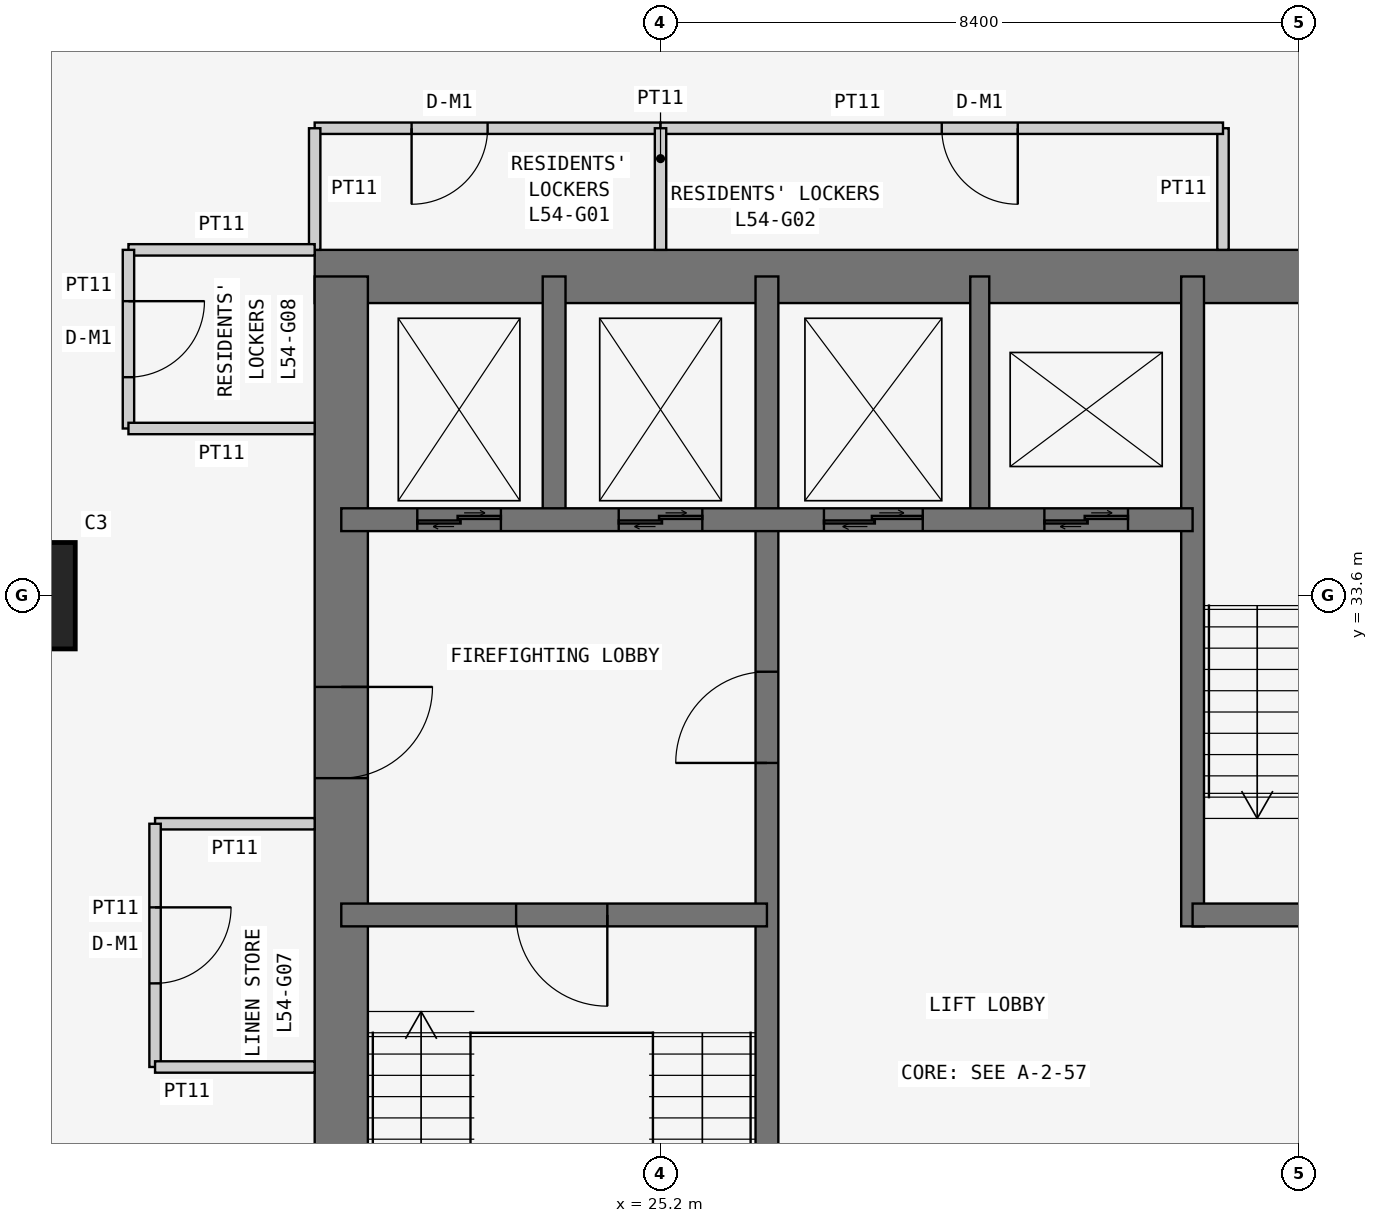
"""IFC4 building model, lengths in metres.
Left out: names, types, materials, properties, quantities, classifications, styles, units other than length and angle.
Written with IfcOpenShell. Run it as: python <this file> out.ifc"""

import sys

from ifc_helpers import new_model, si_unit, direction, frame, frame_2d, origin, origin_2d, place, context, subcontext, project, spatial, rectangle, extrude, element, fill, save


model = new_model("IFC4")
c1 = context("Model", 3, precision=1e-05, world=origin(), true_north=direction((0.0, 1.0)))
c2 = subcontext(c1, "Body", "Model", "MODEL_VIEW")
j1 = project(units=[si_unit("LENGTHUNIT", "METRE"), si_unit("PLANEANGLEUNIT", "RADIAN")], contexts=[c1])
p1 = place(None, origin())
s1 = spatial("IfcSite", under=j1, at=p1, CompositionType="ELEMENT")
p2 = place(p1, origin())
s2 = spatial("IfcBuilding", under=s1, at=p2, CompositionType="ELEMENT")
p3 = place(p2, frame((0.0, 0.0, 208.5)))
s3 = spatial("IfcBuildingStorey", under=s2, at=p3, CompositionType="ELEMENT", Elevation=208.5)
p4 = place(p3, frame((16.8, 33.6, 0.0), z_axis=(0.0, 0.0, 1.0), x_axis=(1.0, 0.0, 0.0)))
e1 = element("IfcColumn", 1, at=p4, inside=s3, PredefinedType="COLUMN", context=c2, shape_type="SweptSolid", body=[
    extrude(rectangle(XDim=1.4, YDim=1.4, at=origin_2d()), origin(), (0.0, 0.0, 1.0), 3.6),
])
p5 = place(p3, frame((37.8, 37.8, 0.0), z_axis=(0.0, 0.0, 1.0), x_axis=(-1.0, 0.0, 0.0)))
e2 = element("IfcWall", 2, at=p5, inside=s3, PredefinedType="SHEAR", context=c2, shape_type="SweptSolid", body=[
    extrude(rectangle(XDim=17.15, YDim=0.7, at=frame_2d((8.575, 0.0))), origin(), (0.0, 0.0, 1.0), 3.6),
])
p6 = place(p3, frame((21.0, 37.8, 0.0), z_axis=(0.0, 0.0, 1.0), x_axis=(0.0, -1.0, 0.0)))
e3 = element("IfcWall", 3, at=p6, inside=s3, PredefinedType="SHEAR", context=c2, shape_type="SweptSolid", body=[
    extrude(rectangle(XDim=17.15, YDim=0.7, at=frame_2d((8.575, 0.0))), origin(), (0.0, 0.0, 1.0), 3.6),
])
p7 = place(p6, frame((5.4, 0.0, 0.0)))
e4 = element("IfcOpeningElement", 4, at=p7, cuts=e3, PredefinedType="OPENING", context=c2, shape_type="SweptSolid", body=[
    extrude(rectangle(XDim=1.2, YDim=2.1, at=frame_2d((0.6, 1.05))), frame((0.0, 0.36, 0.0), z_axis=(0.0, -1.0, 0.0), x_axis=(1.0, 0.0, 0.0)), (0.0, 0.0, 1.0), 0.72),
])
p8 = place(p3, frame((26.6, 21.0, 0.0), z_axis=(0.0, 0.0, 1.0), x_axis=(0.0, 1.0, 0.0)))
e5 = element("IfcWall", 5, at=p8, inside=s3, PredefinedType="SHEAR", context=c2, shape_type="SweptSolid", body=[
    extrude(rectangle(XDim=16.8, YDim=0.3, at=frame_2d((8.4, 0.0))), origin(), (0.0, 0.0, 1.0), 3.6),
])
p9 = place(p8, frame((10.4, 0.0, 0.0)))
e6 = element("IfcOpeningElement", 6, at=p9, cuts=e5, PredefinedType="OPENING", context=c2, shape_type="SweptSolid", body=[
    extrude(rectangle(XDim=1.2, YDim=2.1, at=frame_2d((0.6, 1.05))), frame((0.0, 0.16, 0.0), z_axis=(0.0, -1.0, 0.0), x_axis=(1.0, 0.0, 0.0)), (0.0, 0.0, 1.0), 0.32),
])
p10 = place(p3, frame((21.0, 29.4, 0.0), z_axis=(0.0, 0.0, 1.0), x_axis=(1.0, 0.0, 0.0)))
e7 = element("IfcWall", 7, at=p10, inside=s3, PredefinedType="SHEAR", context=c2, shape_type="SweptSolid", body=[
    extrude(rectangle(XDim=5.6, YDim=0.3, at=frame_2d((2.8, 0.0))), origin(), (0.0, 0.0, 1.0), 3.6),
])
p11 = place(p10, frame((2.3, 0.0, 0.0)))
e8 = element("IfcOpeningElement", 8, at=p11, cuts=e7, PredefinedType="OPENING", context=c2, shape_type="SweptSolid", body=[
    extrude(rectangle(XDim=1.2, YDim=2.1, at=frame_2d((0.6, 1.05))), frame((0.0, 0.16, 0.0), z_axis=(0.0, -1.0, 0.0), x_axis=(1.0, 0.0, 0.0)), (0.0, 0.0, 1.0), 0.32),
])
p12 = place(p3, frame((21.0, 34.6, 0.0), z_axis=(0.0, 0.0, 1.0), x_axis=(1.0, 0.0, 0.0)))
e9 = element("IfcWall", 9, at=p12, inside=s3, PredefinedType="SHEAR", context=c2, shape_type="SweptSolid", body=[
    extrude(rectangle(XDim=11.2, YDim=0.3, at=frame_2d((5.6, 0.0))), origin(), (0.0, 0.0, 1.0), 3.6),
])
p13 = place(p12, frame((9.25, 0.0, 0.0)))
e10 = element("IfcOpeningElement", 10, at=p13, cuts=e9, PredefinedType="OPENING", context=c2, shape_type="SweptSolid", body=[
    extrude(rectangle(XDim=1.1, YDim=2.1, at=frame_2d((0.55, 1.05))), frame((0.0, 0.16, 0.0), z_axis=(0.0, -1.0, 0.0), x_axis=(1.0, 0.0, 0.0)), (0.0, 0.0, 1.0), 0.32),
])
p14 = place(p12, frame((1.0, 0.0, 0.0)))
e11 = element("IfcOpeningElement", 11, at=p14, cuts=e9, PredefinedType="OPENING", context=c2, shape_type="SweptSolid", body=[
    extrude(rectangle(XDim=1.1, YDim=2.1, at=frame_2d((0.55, 1.05))), frame((0.0, 0.16, 0.0), z_axis=(0.0, -1.0, 0.0), x_axis=(1.0, 0.0, 0.0)), (0.0, 0.0, 1.0), 0.32),
])
p15 = place(p12, frame((3.65, 0.0, 0.0)))
e12 = element("IfcOpeningElement", 12, at=p15, cuts=e9, PredefinedType="OPENING", context=c2, shape_type="SweptSolid", body=[
    extrude(rectangle(XDim=1.1, YDim=2.1, at=frame_2d((0.55, 1.05))), frame((0.0, 0.16, 0.0), z_axis=(0.0, -1.0, 0.0), x_axis=(1.0, 0.0, 0.0)), (0.0, 0.0, 1.0), 0.32),
])
p16 = place(p12, frame((6.35, 0.0, 0.0)))
e13 = element("IfcOpeningElement", 13, at=p16, cuts=e9, PredefinedType="OPENING", context=c2, shape_type="SweptSolid", body=[
    extrude(rectangle(XDim=1.3, YDim=2.1, at=frame_2d((0.65, 1.05))), frame((0.0, 0.16, 0.0), z_axis=(0.0, -1.0, 0.0), x_axis=(1.0, 0.0, 0.0)), (0.0, 0.0, 1.0), 0.32),
])
p17 = place(p3, frame((23.8, 34.6, 0.0), z_axis=(0.0, 0.0, 1.0), x_axis=(0.0, 1.0, 0.0)))
e14 = element("IfcWall", 14, at=p17, inside=s3, PredefinedType="SHEAR", context=c2, shape_type="SweptSolid", body=[
    extrude(rectangle(XDim=3.2, YDim=0.3, at=frame_2d((1.6, 0.0))), origin(), (0.0, 0.0, 1.0), 3.6),
])
p18 = place(p3, frame((32.2, 29.25, 0.0), z_axis=(0.0, 0.0, 1.0), x_axis=(0.0, 1.0, 0.0)))
e15 = element("IfcWall", 15, at=p18, inside=s3, PredefinedType="SHEAR", context=c2, shape_type="SweptSolid", body=[
    extrude(rectangle(XDim=8.55, YDim=0.3, at=frame_2d((4.275, 0.0))), origin(), (0.0, 0.0, 1.0), 3.6),
])
p19 = place(p3, frame((32.2, 29.4, 0.0), z_axis=(0.0, 0.0, 1.0), x_axis=(1.0, 0.0, 0.0)))
e16 = element("IfcWall", 16, at=p19, inside=s3, PredefinedType="SHEAR", context=c2, shape_type="SweptSolid", body=[
    extrude(rectangle(XDim=5.6, YDim=0.3, at=frame_2d((2.8, 0.0))), origin(), (0.0, 0.0, 1.0), 3.6),
])
p20 = place(p19, frame((2.0, 0.0, 0.0)))
e17 = element("IfcOpeningElement", 17, at=p20, cuts=e16, PredefinedType="OPENING", context=c2, shape_type="SweptSolid", body=[
    extrude(rectangle(XDim=1.2, YDim=2.1, at=frame_2d((0.6, 1.05))), frame((0.0, 0.16, 0.0), z_axis=(0.0, -1.0, 0.0), x_axis=(1.0, 0.0, 0.0)), (0.0, 0.0, 1.0), 0.32),
])
p21 = place(p3, frame((29.4, 34.6, 0.0), z_axis=(0.0, 0.0, 1.0), x_axis=(0.0, 1.0, 0.0)))
e18 = element("IfcWall", 18, at=p21, inside=s3, PredefinedType="SHEAR", context=c2, shape_type="SweptSolid", body=[
    extrude(rectangle(XDim=3.2, YDim=0.25, at=frame_2d((1.6, 0.0))), origin(), (0.0, 0.0, 1.0), 3.6),
])
p22 = place(p3, frame((25.2, 39.75, 0.0), z_axis=(0.0, 0.0, 1.0), x_axis=(-1.0, 0.0, 0.0)))
e19 = element("IfcWall", 19, at=p22, inside=s3, PredefinedType="PARTITIONING", context=c2, shape_type="SweptSolid", body=[
    extrude(rectangle(XDim=4.55, YDim=0.15, at=frame_2d((2.275, 0.0))), origin(), (0.0, 0.0, 1.0), 3.45),
])
p23 = place(p22, frame((2.275, 0.0, 0.0)))
e20 = element("IfcOpeningElement", 20, at=p23, cuts=e19, PredefinedType="OPENING", context=c2, shape_type="SweptSolid", body=[
    extrude(rectangle(XDim=1.0, YDim=2.1, at=frame_2d((0.5, 1.05))), frame((0.0, 0.085, 0.0), z_axis=(0.0, -1.0, 0.0), x_axis=(1.0, 0.0, 0.0)), (0.0, 0.0, 1.0), 0.17),
])
for number, where, z_axis, x_axis in (
    (21, (20.65, 39.75, 0.0), (0.0, 0.0, 1.0), (0.0, -1.0, 0.0)),
    (22, (32.6, 38.15, 0.0), (0.0, 0.0, 1.0), (0.0, 1.0, 0.0)),
):
    element("IfcWall", number, at=place(p3, frame(where, z_axis=z_axis, x_axis=x_axis)), inside=s3, PredefinedType="PARTITIONING", context=c2, shape_type="SweptSolid", body=[
        extrude(rectangle(XDim=1.6, YDim=0.15, at=frame_2d((0.8, 0.0))), origin(), (0.0, 0.0, 1.0), 3.45),
    ])
p24 = place(p3, frame((32.6, 39.75, 0.0), z_axis=(0.0, 0.0, 1.0), x_axis=(-1.0, 0.0, 0.0)))
e23 = element("IfcWall", 23, at=p24, inside=s3, PredefinedType="PARTITIONING", context=c2, shape_type="SweptSolid", body=[
    extrude(rectangle(XDim=7.4, YDim=0.15, at=frame_2d((3.7, 0.0))), origin(), (0.0, 0.0, 1.0), 3.45),
])
p25 = place(p24, frame((2.7, 0.0, 0.0)))
e24 = element("IfcOpeningElement", 24, at=p25, cuts=e23, PredefinedType="OPENING", context=c2, shape_type="SweptSolid", body=[
    extrude(rectangle(XDim=1.0, YDim=2.1, at=frame_2d((0.5, 1.05))), frame((0.0, 0.085, 0.0), z_axis=(0.0, -1.0, 0.0), x_axis=(1.0, 0.0, 0.0)), (0.0, 0.0, 1.0), 0.17),
])
p26 = place(p3, frame((20.65, 30.6, 0.0), z_axis=(0.0, 0.0, 1.0), x_axis=(-1.0, 0.0, 0.0)))
e25 = element("IfcWall", 25, at=p26, inside=s3, PredefinedType="PARTITIONING", context=c2, shape_type="SweptSolid", body=[
    extrude(rectangle(XDim=2.1, YDim=0.15, at=frame_2d((1.05, 0.0))), origin(), (0.0, 0.0, 1.0), 3.45),
])
p27 = place(p3, frame((18.55, 30.6, 0.0), z_axis=(0.0, 0.0, 1.0), x_axis=(0.0, -1.0, 0.0)))
e26 = element("IfcWall", 26, at=p27, inside=s3, PredefinedType="PARTITIONING", context=c2, shape_type="SweptSolid", body=[
    extrude(rectangle(XDim=3.2, YDim=0.15, at=frame_2d((1.6, 0.0))), origin(), (0.0, 0.0, 1.0), 3.45),
])
p28 = place(p27, frame((1.1, 0.0, 0.0)))
e27 = element("IfcOpeningElement", 27, at=p28, cuts=e26, PredefinedType="OPENING", context=c2, shape_type="SweptSolid", body=[
    extrude(rectangle(XDim=1.0, YDim=2.1, at=frame_2d((0.5, 1.05))), frame((0.0, 0.085, 0.0), z_axis=(0.0, -1.0, 0.0), x_axis=(1.0, 0.0, 0.0)), (0.0, 0.0, 1.0), 0.17),
])
p29 = place(p3, frame((18.55, 27.4, 0.0), z_axis=(0.0, 0.0, 1.0), x_axis=(1.0, 0.0, 0.0)))
e28 = element("IfcWall", 28, at=p29, inside=s3, PredefinedType="PARTITIONING", context=c2, shape_type="SweptSolid", body=[
    extrude(rectangle(XDim=2.1, YDim=0.15, at=frame_2d((1.05, 0.0))), origin(), (0.0, 0.0, 1.0), 3.45),
])
p30 = place(p3, frame((20.65, 38.15, 0.0), z_axis=(0.0, 0.0, 1.0), x_axis=(-1.0, 0.0, 0.0)))
e29 = element("IfcWall", 29, at=p30, inside=s3, PredefinedType="PARTITIONING", context=c2, shape_type="SweptSolid", body=[
    extrude(rectangle(XDim=2.45, YDim=0.15, at=frame_2d((1.225, 0.0))), origin(), (0.0, 0.0, 1.0), 3.45),
])
p31 = place(p3, frame((18.2, 38.15, 0.0), z_axis=(0.0, 0.0, 1.0), x_axis=(0.0, -1.0, 0.0)))
e30 = element("IfcWall", 30, at=p31, inside=s3, PredefinedType="PARTITIONING", context=c2, shape_type="SweptSolid", body=[
    extrude(rectangle(XDim=2.35, YDim=0.15, at=frame_2d((1.175, 0.0))), origin(), (0.0, 0.0, 1.0), 3.45),
])
p32 = place(p31, frame((0.675, 0.0, 0.0)))
e31 = element("IfcOpeningElement", 31, at=p32, cuts=e30, PredefinedType="OPENING", context=c2, shape_type="SweptSolid", body=[
    extrude(rectangle(XDim=1.0, YDim=2.1, at=frame_2d((0.5, 1.05))), frame((0.0, 0.085, 0.0), z_axis=(0.0, -1.0, 0.0), x_axis=(1.0, 0.0, 0.0)), (0.0, 0.0, 1.0), 0.17),
])
p33 = place(p3, frame((18.2, 35.8, 0.0), z_axis=(0.0, 0.0, 1.0), x_axis=(1.0, 0.0, 0.0)))
e32 = element("IfcWall", 32, at=p33, inside=s3, PredefinedType="PARTITIONING", context=c2, shape_type="SweptSolid", body=[
    extrude(rectangle(XDim=2.45, YDim=0.15, at=frame_2d((1.225, 0.0))), origin(), (0.0, 0.0, 1.0), 3.45),
])
p34 = place(p3, frame((25.2, 38.15, 0.0), z_axis=(0.0, 0.0, 1.0), x_axis=(0.0, 1.0, 0.0)))
e33 = element("IfcWall", 33, at=p34, inside=s3, PredefinedType="PARTITIONING", context=c2, shape_type="SweptSolid", body=[
    extrude(rectangle(XDim=1.6, YDim=0.15, at=frame_2d((0.8, 0.0))), origin(), (0.0, 0.0, 1.0), 2.767),
])
p35 = place(p23, origin())
e34 = element("IfcDoor", 34, at=p35, inside=s3, OperationType="SINGLE_SWING_RIGHT", PredefinedType="DOOR", context=c2, shape_type="SweptSolid", body=[
    extrude(rectangle(XDim=1.0, YDim=2.1, at=frame_2d((0.5, 1.05))), frame((0.0, 0.025, 0.0), z_axis=(0.0, -1.0, 0.0), x_axis=(1.0, 0.0, 0.0)), (0.0, 0.0, 1.0), 0.05),
])
fill(e20, e34)
p36 = place(p25, origin())
e35 = element("IfcDoor", 35, at=p36, inside=s3, OperationType="SINGLE_SWING_LEFT", PredefinedType="DOOR", context=c2, shape_type="SweptSolid", body=[
    extrude(rectangle(XDim=1.0, YDim=2.1, at=frame_2d((0.5, 1.05))), frame((0.0, 0.025, 0.0), z_axis=(0.0, -1.0, 0.0), x_axis=(1.0, 0.0, 0.0)), (0.0, 0.0, 1.0), 0.05),
])
fill(e24, e35)
p37 = place(p28, origin())
e36 = element("IfcDoor", 36, at=p37, inside=s3, OperationType="SINGLE_SWING_LEFT", PredefinedType="DOOR", context=c2, shape_type="SweptSolid", body=[
    extrude(rectangle(XDim=1.0, YDim=2.1, at=frame_2d((0.5, 1.05))), frame((0.0, 0.025, 0.0), z_axis=(0.0, -1.0, 0.0), x_axis=(1.0, 0.0, 0.0)), (0.0, 0.0, 1.0), 0.05),
])
fill(e27, e36)
p38 = place(p32, origin())
e37 = element("IfcDoor", 37, at=p38, inside=s3, OperationType="SINGLE_SWING_LEFT", PredefinedType="DOOR", context=c2, shape_type="SweptSolid", body=[
    extrude(rectangle(XDim=1.0, YDim=2.1, at=frame_2d((0.5, 1.05))), frame((0.0, 0.025, 0.0), z_axis=(0.0, -1.0, 0.0), x_axis=(1.0, 0.0, 0.0)), (0.0, 0.0, 1.0), 0.05),
])
fill(e31, e37)
p39 = place(p7, origin())
e38 = element("IfcDoor", 38, at=p39, inside=s3, OperationType="SINGLE_SWING_LEFT", PredefinedType="DOOR", context=c2, shape_type="SweptSolid", body=[
    extrude(rectangle(XDim=1.2, YDim=2.1, at=frame_2d((0.6, 1.05))), frame((0.0, 0.025, 0.0), z_axis=(0.0, -1.0, 0.0), x_axis=(1.0, 0.0, 0.0)), (0.0, 0.0, 1.0), 0.05),
])
fill(e4, e38)
p40 = place(p11, frame((1.2, 0.0, 0.0), z_axis=(0.0, 0.0, 1.0), x_axis=(-1.0, 0.0, 0.0)))
e39 = element("IfcDoor", 39, at=p40, inside=s3, OperationType="SINGLE_SWING_LEFT", PredefinedType="DOOR", context=c2, shape_type="SweptSolid", body=[
    extrude(rectangle(XDim=1.2, YDim=2.1, at=frame_2d((0.6, 1.05))), frame((0.0, 0.025, 0.0), z_axis=(0.0, -1.0, 0.0), x_axis=(1.0, 0.0, 0.0)), (0.0, 0.0, 1.0), 0.05),
])
fill(e8, e39)
p41 = place(p9, origin())
e40 = element("IfcDoor", 40, at=p41, inside=s3, OperationType="SINGLE_SWING_LEFT", PredefinedType="DOOR", context=c2, shape_type="SweptSolid", body=[
    extrude(rectangle(XDim=1.2, YDim=2.1, at=frame_2d((0.6, 1.05))), frame((0.0, 0.025, 0.0), z_axis=(0.0, -1.0, 0.0), x_axis=(1.0, 0.0, 0.0)), (0.0, 0.0, 1.0), 0.05),
])
fill(e6, e40)
p42 = place(p13, origin())
e41 = element("IfcDoor", 41, at=p42, inside=s3, OperationType="DOUBLE_DOOR_SLIDING", PredefinedType="DOOR", context=c2, shape_type="SweptSolid", body=[
    extrude(rectangle(XDim=1.1, YDim=2.1, at=frame_2d((0.55, 1.05))), frame((0.0, 0.025, 0.0), z_axis=(0.0, -1.0, 0.0), x_axis=(1.0, 0.0, 0.0)), (0.0, 0.0, 1.0), 0.05),
])
fill(e10, e41)
p43 = place(p14, origin())
e42 = element("IfcDoor", 42, at=p43, inside=s3, OperationType="DOUBLE_DOOR_SLIDING", PredefinedType="DOOR", context=c2, shape_type="SweptSolid", body=[
    extrude(rectangle(XDim=1.1, YDim=2.1, at=frame_2d((0.55, 1.05))), frame((0.0, 0.025, 0.0), z_axis=(0.0, -1.0, 0.0), x_axis=(1.0, 0.0, 0.0)), (0.0, 0.0, 1.0), 0.05),
])
fill(e11, e42)
p44 = place(p15, origin())
e43 = element("IfcDoor", 43, at=p44, inside=s3, OperationType="DOUBLE_DOOR_SLIDING", PredefinedType="DOOR", context=c2, shape_type="SweptSolid", body=[
    extrude(rectangle(XDim=1.1, YDim=2.1, at=frame_2d((0.55, 1.05))), frame((0.0, 0.025, 0.0), z_axis=(0.0, -1.0, 0.0), x_axis=(1.0, 0.0, 0.0)), (0.0, 0.0, 1.0), 0.05),
])
fill(e12, e43)
p45 = place(p16, origin())
e44 = element("IfcDoor", 44, at=p45, inside=s3, OperationType="DOUBLE_DOOR_SLIDING", PredefinedType="DOOR", context=c2, shape_type="SweptSolid", body=[
    extrude(rectangle(XDim=1.3, YDim=2.1, at=frame_2d((0.65, 1.05))), frame((0.0, 0.025, 0.0), z_axis=(0.0, -1.0, 0.0), x_axis=(1.0, 0.0, 0.0)), (0.0, 0.0, 1.0), 0.05),
])
fill(e13, e44)
save(model, sys.argv[1])
